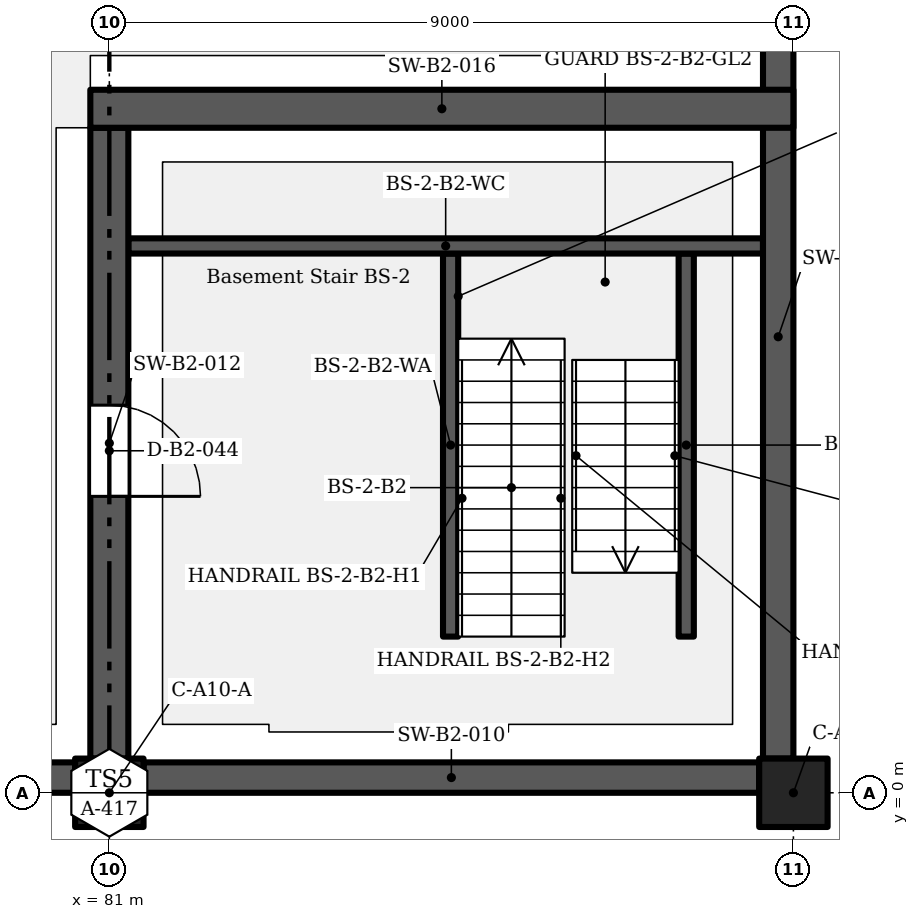
"""IFC4 building model, lengths in metres.
Left out: names, types, materials, properties, quantities, classifications, styles, units other than length and angle.
Written with IfcOpenShell. Run it as: python <this file> out.ifc"""

import sys

from ifc_helpers import new_model, si_unit, direction, frame, frame_2d, origin, origin_2d, place, context, subcontext, project, spatial, rectangle, extrude, element, fill, save


model = new_model("IFC4")
c1 = context("Model", 3, precision=1e-05, world=origin(), true_north=direction((0.0, 1.0)))
c2 = subcontext(c1, "Body", "Model", "MODEL_VIEW")
j1 = project(units=[si_unit("LENGTHUNIT", "METRE"), si_unit("PLANEANGLEUNIT", "RADIAN")], contexts=[c1])
p1 = place(None, origin())
s1 = spatial("IfcSite", under=j1, at=p1, CompositionType="ELEMENT")
p2 = place(p1, origin())
s2 = spatial("IfcBuilding", under=s1, at=p2, CompositionType="ELEMENT")
p3 = place(p2, frame((0.0, 0.0, -8.4)))
s3 = spatial("IfcBuildingStorey", under=s2, at=p3, CompositionType="ELEMENT", Elevation=-8.4)
for number, where, z_axis, x_axis in (
    (1, (81.0, 0.0, 0.0), (0.0, 0.0, 1.0), (1.0, 0.0, 0.0)),
    (2, (90.0, 0.0, 0.0), (0.0, 0.0, 1.0), (1.0, 0.0, 0.0)),
):
    element("IfcColumn", number, at=place(p3, frame(where, z_axis=z_axis, x_axis=x_axis)), inside=s3, PredefinedType="COLUMN", context=c2, shape_type="SweptSolid", body=[
        extrude(rectangle(XDim=0.9, YDim=0.9, at=origin_2d()), origin(), (0.0, 0.0, 1.0), 4.2),
    ])
for number, where, z_axis, x_axis in (
    (3, (72.45, 0.2, 0.0), (0.0, 0.0, 1.0), (1.0, 0.0, 0.0)),
    (4, (81.45, 0.2, 0.0), (0.0, 0.0, 1.0), (1.0, 0.0, 0.0)),
):
    element("IfcWall", number, at=place(p3, frame(where, z_axis=z_axis, x_axis=x_axis)), inside=s3, PredefinedType="SOLIDWALL", context=c2, shape_type="SweptSolid", body=[
        extrude(rectangle(XDim=8.1, YDim=0.4, at=frame_2d((4.05, 0.0))), origin(), (0.0, 0.0, 1.0), 3.8),
    ])
p4 = place(p3, frame((81.0, 0.45, 0.0), z_axis=(0.0, 0.0, 1.0), x_axis=(0.0, 1.0, 0.0)))
e5 = element("IfcWall", 5, at=p4, inside=s3, PredefinedType="SHEAR", context=c2, shape_type="SweptSolid", body=[
    extrude(rectangle(XDim=8.3, YDim=0.5, at=frame_2d((4.15, 0.0))), origin(), (0.0, 0.0, 1.0), 3.8),
])
p5 = place(p4, frame((4.65, 0.0, 0.0), z_axis=(0.0, 0.0, 1.0), x_axis=(-1.0, 0.0, 0.0)))
e6 = element("IfcOpeningElement", 6, at=p5, cuts=e5, PredefinedType="OPENING", context=c2, shape_type="SweptSolid", body=[
    extrude(rectangle(XDim=1.2, YDim=2.1, at=frame_2d((0.6, 1.05))), frame((0.0, 0.26, 0.0), z_axis=(0.0, -1.0, 0.0), x_axis=(1.0, 0.0, 0.0)), (0.0, 0.0, 1.0), 0.52),
])
p6 = place(p3, frame((89.8, 0.45, 0.0), z_axis=(0.0, 0.0, 1.0), x_axis=(0.0, 1.0, 0.0)))
e7 = element("IfcWall", 7, at=p6, inside=s3, PredefinedType="SOLIDWALL", context=c2, shape_type="SweptSolid", body=[
    extrude(rectangle(XDim=11.1, YDim=0.4, at=frame_2d((5.55, 0.0))), origin(), (0.0, 0.0, 1.0), 3.8),
])
p7 = place(p3, frame((80.75, 9.0, 0.0), z_axis=(0.0, 0.0, 1.0), x_axis=(1.0, 0.0, 0.0)))
e8 = element("IfcWall", 8, at=p7, inside=s3, PredefinedType="SHEAR", context=c2, shape_type="SweptSolid", body=[
    extrude(rectangle(XDim=9.25, YDim=0.5, at=frame_2d((4.625, 0.0))), origin(), (0.0, 0.0, 1.0), 3.8),
])
for number, where, z_axis, x_axis in (
    (9, (85.49, 2.055, 0.0), (0.0, 0.0, 1.0), (0.0, 1.0, 0.0)),
    (10, (88.59, 2.055, 0.0), (0.0, 0.0, 1.0), (0.0, 1.0, 0.0)),
):
    element("IfcWall", number, at=place(p3, frame(where, z_axis=z_axis, x_axis=x_axis)), inside=s3, PredefinedType="SHEAR", context=c2, shape_type="SweptSolid", body=[
        extrude(rectangle(XDim=5.04, YDim=0.2, at=frame_2d((2.52, 0.0))), origin(), (0.0, 0.0, 1.0), 3.8),
    ])
p8 = place(p3, frame((81.25, 7.195, 0.0), z_axis=(0.0, 0.0, 1.0), x_axis=(1.0, 0.0, 0.0)))
e11 = element("IfcWall", 11, at=p8, inside=s3, PredefinedType="SHEAR", context=c2, shape_type="SweptSolid", body=[
    extrude(rectangle(XDim=8.35, YDim=0.2, at=frame_2d((4.175, 0.0))), origin(), (0.0, 0.0, 1.0), 3.8),
])
p9 = place(p5, origin())
e12 = element("IfcDoor", 12, at=p9, inside=s3, OperationType="SINGLE_SWING_RIGHT", PredefinedType="DOOR", context=c2, shape_type="SweptSolid", body=[
    extrude(rectangle(XDim=1.2, YDim=2.1, at=frame_2d((0.6, 1.05))), frame((0.0, 0.025, 0.0), z_axis=(0.0, -1.0, 0.0), x_axis=(1.0, 0.0, 0.0)), (0.0, 0.0, 1.0), 0.05),
])
fill(e6, e12)
save(model, sys.argv[1])
